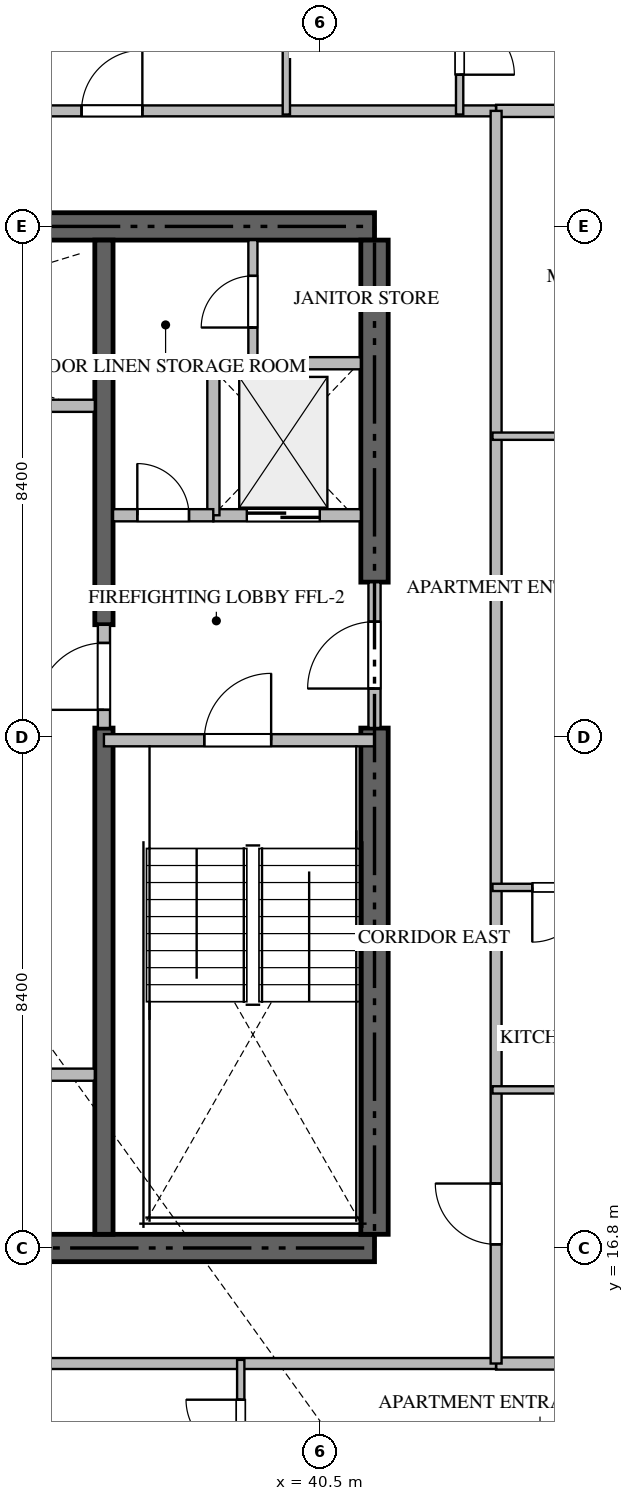
"""IFC4 building model, lengths in metres.
Left out: names, types, materials, properties, quantities, classifications, styles, units other than length and angle.
Written with IfcOpenShell. Run it as: python <this file> out.ifc"""

import sys

from ifc_helpers import new_model, si_unit, direction, frame, frame_2d, origin, place, context, subcontext, project, spatial, rectangle, extrude, source, transform, mapped, element, fill, save


model = new_model("IFC4")
c1 = context("Model", 3, precision=1e-05, world=origin(), true_north=direction((0.0, 1.0)))
c2 = subcontext(c1, "Body", "Model", "MODEL_VIEW")
j1 = project(units=[si_unit("LENGTHUNIT", "METRE"), si_unit("PLANEANGLEUNIT", "RADIAN")], contexts=[c1])
p1 = place(None, origin())
s1 = spatial("IfcSite", under=j1, at=p1, CompositionType="ELEMENT")
p2 = place(p1, origin())
s2 = spatial("IfcBuilding", under=s1, at=p2, CompositionType="ELEMENT")
p3 = place(p2, frame((0.0, 0.0, 41.7)))
s3 = spatial("IfcBuildingStorey", under=s2, at=p3, CompositionType="ELEMENT", Elevation=41.7)
for number, where, z_axis, x_axis in (
    (1, (23.4, 16.8, -0.26), (0.0, 0.0, 1.0), (1.0, 0.0, 0.0)),
    (2, (41.4, 33.6, -0.26), (0.0, 0.0, 1.0), (-1.0, 0.0, 0.0)),
):
    element("IfcWall", number, at=place(p3, frame(where, z_axis=z_axis, x_axis=x_axis)), inside=s3, PredefinedType="SHEAR", context=c2, shape_type="SweptSolid", body=[
        extrude(rectangle(XDim=18.0, YDim=0.45, at=frame_2d((9.0, 0.0))), origin(), (0.0, 0.0, 1.0), 3.748),
    ])
p4 = place(p3, frame((41.4, 17.025, -0.26), z_axis=(0.0, 0.0, 1.0), x_axis=(0.0, 1.0, 0.0)))
e3 = element("IfcWall", 3, at=p4, inside=s3, PredefinedType="SHEAR", context=c2, shape_type="SweptSolid", body=[
    extrude(rectangle(XDim=8.325, YDim=0.45, at=frame_2d((4.163, 0.0))), origin(), (0.0, 0.0, 1.0), 3.748),
])
p5 = place(p3, frame((41.4, 27.75, -0.26), z_axis=(0.0, 0.0, 1.0), x_axis=(0.0, 1.0, 0.0)))
e4 = element("IfcWall", 4, at=p5, inside=s3, PredefinedType="SHEAR", context=c2, shape_type="SweptSolid", body=[
    extrude(rectangle(XDim=5.625, YDim=0.45, at=frame_2d((2.812, 0.0))), origin(), (0.0, 0.0, 1.0), 3.748),
])
p6 = place(p3, frame((36.95, 17.025, -0.26), z_axis=(0.0, 0.0, 1.0), x_axis=(0.0, 1.0, 0.0)))
e5 = element("IfcWall", 5, at=p6, inside=s3, PredefinedType="SHEAR", context=c2, shape_type="SweptSolid", body=[
    extrude(rectangle(XDim=8.325, YDim=0.3, at=frame_2d((4.163, 0.0))), origin(), (0.0, 0.0, 1.0), 3.748),
])
p7 = place(p3, frame((36.95, 27.05, -0.26), z_axis=(0.0, 0.0, 1.0), x_axis=(0.0, 1.0, 0.0)))
e6 = element("IfcWall", 6, at=p7, inside=s3, PredefinedType="SHEAR", context=c2, shape_type="SweptSolid", body=[
    extrude(rectangle(XDim=6.325, YDim=0.3, at=frame_2d((3.163, 0.0))), origin(), (0.0, 0.0, 1.0), 3.748),
])
p8 = place(p3, frame((36.95, 25.15, 0.0), z_axis=(0.0, 0.0, 1.0), x_axis=(1.0, 0.0, 0.0)))
e7 = element("IfcWall", 7, at=p8, inside=s3, PredefinedType="STANDARD", context=c2, shape_type="SweptSolid", body=[
    extrude(rectangle(XDim=4.45, YDim=0.2, at=frame_2d((2.225, 0.0))), origin(), (0.0, 0.0, 1.0), 3.49),
])
p9 = place(p8, frame((1.65, 0.0, 0.0)))
e8 = element("IfcOpeningElement", 8, at=p9, cuts=e7, PredefinedType="OPENING", context=c2, shape_type="SweptSolid", body=[
    extrude(rectangle(XDim=1.1, YDim=2.15, at=frame_2d((0.55, 1.075))), frame((0.0, 0.11, 0.0), z_axis=(0.0, -1.0, 0.0), x_axis=(1.0, 0.0, 0.0)), (0.0, 0.0, 1.0), 0.22),
])
p10 = place(p3, frame((38.75, 28.85, 0.0), z_axis=(0.0, 0.0, 1.0), x_axis=(1.0, 0.0, 0.0)))
e9 = element("IfcWall", 9, at=p10, inside=s3, PredefinedType="STANDARD", context=c2, shape_type="SweptSolid", body=[
    extrude(rectangle(XDim=2.425, YDim=0.2, at=frame_2d((1.212, 0.0))), origin(), (0.0, 0.0, 1.0), 3.49),
])
p11 = place(p10, frame((0.55, 0.0, 0.0)))
e10 = element("IfcOpeningElement", 10, at=p11, cuts=e9, PredefinedType="OPENING", context=c2, shape_type="SweptSolid", body=[
    extrude(rectangle(XDim=1.2, YDim=2.2, at=frame_2d((0.6, 1.1))), frame((0.0, 0.11, 0.0), z_axis=(0.0, -1.0, 0.0), x_axis=(1.0, 0.0, 0.0)), (0.0, 0.0, 1.0), 0.22),
])
p12 = place(p3, frame((33.05, 19.65, 0.0), z_axis=(0.0, 0.0, 1.0), x_axis=(1.0, 0.0, 0.0)))
e11 = element("IfcWall", 11, at=p12, inside=s3, PredefinedType="STANDARD", context=c2, shape_type="SweptSolid", body=[
    extrude(rectangle(XDim=3.75, YDim=0.2, at=frame_2d((1.875, 0.0))), origin(), (0.0, 0.0, 1.0), 3.49),
])
p13 = place(p12, frame((0.65, 0.0, 0.0)))
e12 = element("IfcOpeningElement", 12, at=p13, cuts=e11, PredefinedType="OPENING", context=c2, shape_type="SweptSolid", body=[
    extrude(rectangle(XDim=1.1, YDim=2.2, at=frame_2d((0.55, 1.1))), frame((0.0, 0.11, 0.0), z_axis=(0.0, -1.0, 0.0), x_axis=(1.0, 0.0, 0.0)), (0.0, 0.0, 1.0), 0.22),
])
p14 = place(p3, frame((35.0, 30.65, 0.0), z_axis=(0.0, 0.0, 1.0), x_axis=(1.0, 0.0, 0.0)))
e13 = element("IfcWall", 13, at=p14, inside=s3, PredefinedType="STANDARD", context=c2, shape_type="SweptSolid", body=[
    extrude(rectangle(XDim=1.8, YDim=0.2, at=frame_2d((0.9, 0.0))), origin(), (0.0, 0.0, 1.0), 3.49),
])
p15 = place(p3, frame((38.75, 28.85, 0.0), z_axis=(0.0, 0.0, 1.0), x_axis=(0.0, 1.0, 0.0)))
e14 = element("IfcWall", 14, at=p15, inside=s3, PredefinedType="STANDARD", context=c2, shape_type="SweptSolid", body=[
    extrude(rectangle(XDim=2.5, YDim=0.2, at=frame_2d((1.25, 0.0))), origin(), (0.0, 0.0, 1.0), 3.49),
])
p16 = place(p3, frame((38.75, 31.35, 0.0), z_axis=(0.0, 0.0, 1.0), x_axis=(1.0, 0.0, 0.0)))
e15 = element("IfcWall", 15, at=p16, inside=s3, PredefinedType="STANDARD", context=c2, shape_type="SweptSolid", body=[
    extrude(rectangle(XDim=2.425, YDim=0.2, at=frame_2d((1.212, 0.0))), origin(), (0.0, 0.0, 1.0), 3.49),
])
p17 = place(p3, frame((37.1, 28.85, 0.0), z_axis=(0.0, 0.0, 1.0), x_axis=(1.0, 0.0, 0.0)))
e16 = element("IfcWall", 16, at=p17, inside=s3, PredefinedType="STANDARD", context=c2, shape_type="SweptSolid", body=[
    extrude(rectangle(XDim=1.648, YDim=0.2, at=frame_2d((0.824, 0.0))), origin(), (0.0, 0.0, 1.0), 3.49),
])
p18 = place(p17, frame((0.399, 0.0, 0.0)))
e17 = element("IfcOpeningElement", 17, at=p18, cuts=e16, PredefinedType="OPENING", context=c2, shape_type="SweptSolid", body=[
    extrude(rectangle(XDim=0.85, YDim=2.1, at=frame_2d((0.425, 1.05))), frame((0.0, 0.11, 0.0), z_axis=(0.0, -1.0, 0.0), x_axis=(1.0, 0.0, 0.0)), (0.0, 0.0, 1.0), 0.22),
])
p19 = place(p3, frame((41.4, 25.352, 0.0), z_axis=(0.0, 0.0, 1.0), x_axis=(0.0, 1.0, 0.0)))
e18 = element("IfcWall", 18, at=p19, inside=s3, PredefinedType="STANDARD", context=c2, shape_type="SweptSolid", body=[
    extrude(rectangle(XDim=2.396, YDim=0.2, at=frame_2d((1.198, 0.0))), origin(), (0.0, 0.0, 1.0), 3.49),
])
p20 = place(p19, frame((0.648, 0.0, 0.0)))
e19 = element("IfcOpeningElement", 19, at=p20, cuts=e18, PredefinedType="OPENING", context=c2, shape_type="SweptSolid", body=[
    extrude(rectangle(XDim=1.1, YDim=2.15, at=frame_2d((0.55, 1.075))), frame((0.0, 0.11, 0.0), z_axis=(0.0, -1.0, 0.0), x_axis=(1.0, 0.0, 0.0)), (0.0, 0.0, 1.0), 0.22),
])
p21 = place(p3, frame((36.95, 25.352, 0.0), z_axis=(0.0, 0.0, 1.0), x_axis=(0.0, 1.0, 0.0)))
e20 = element("IfcWall", 20, at=p21, inside=s3, PredefinedType="STANDARD", context=c2, shape_type="SweptSolid", body=[
    extrude(rectangle(XDim=1.696, YDim=0.2, at=frame_2d((0.848, 0.0))), origin(), (0.0, 0.0, 1.0), 3.49),
])
p22 = place(p21, frame((0.298, 0.0, 0.0)))
e21 = element("IfcOpeningElement", 21, at=p22, cuts=e20, PredefinedType="OPENING", context=c2, shape_type="SweptSolid", body=[
    extrude(rectangle(XDim=1.1, YDim=2.15, at=frame_2d((0.55, 1.075))), frame((0.0, 0.11, 0.0), z_axis=(0.0, -1.0, 0.0), x_axis=(1.0, 0.0, 0.0)), (0.0, 0.0, 1.0), 0.22),
])
p23 = place(p3, frame((39.4, 31.35, 0.0), z_axis=(0.0, 0.0, 1.0), x_axis=(0.0, 1.0, 0.0)))
e22 = element("IfcWall", 22, at=p23, inside=s3, PredefinedType="PARTITIONING", context=c2, shape_type="SweptSolid", body=[
    extrude(rectangle(XDim=2.025, YDim=0.15, at=frame_2d((1.012, 0.0))), origin(), (0.0, 0.0, 1.0), 3.49),
])
p24 = place(p23, frame((0.587, 0.0, 0.0)))
e23 = element("IfcOpeningElement", 23, at=p24, cuts=e22, PredefinedType="OPENING", context=c2, shape_type="SweptSolid", body=[
    extrude(rectangle(XDim=0.85, YDim=2.1, at=frame_2d((0.425, 1.05))), frame((0.0, 0.085, 0.0), z_axis=(0.0, -1.0, 0.0), x_axis=(1.0, 0.0, 0.0)), (0.0, 0.0, 1.0), 0.17),
])
for number, where, z_axis, x_axis in (
    (24, (43.4, 14.9, 0.0), (0.0, 0.0, 1.0), (1.0, 0.0, 0.0)),
    (25, (43.4, 35.5, 0.0), (0.0, 0.0, 1.0), (1.0, 0.0, 0.0)),
):
    element("IfcWall", number, at=place(p3, frame(where, z_axis=z_axis, x_axis=x_axis)), inside=s3, PredefinedType="PARTITIONING", context=c2, shape_type="SweptSolid", body=[
        extrude(rectangle(XDim=15.318, YDim=0.2, at=frame_2d((7.659, 0.0))), origin(), (0.0, 0.0, 1.0), 3.49),
    ])
p25 = place(p3, frame((21.402, 14.9, 0.0), z_axis=(0.0, 0.0, 1.0), x_axis=(1.0, 0.0, 0.0)))
e26 = element("IfcWall", 26, at=p25, inside=s3, PredefinedType="PARTITIONING", context=c2, shape_type="SweptSolid", body=[
    extrude(rectangle(XDim=21.996, YDim=0.18, at=frame_2d((10.998, 0.0))), origin(), (0.0, 0.0, 1.0), 3.49),
])
p26 = place(p25, frame((5.816, 0.0, 0.0)))
e27 = element("IfcOpeningElement", 27, at=p26, cuts=e26, PredefinedType="OPENING", context=c2, shape_type="SweptSolid", body=[
    extrude(rectangle(XDim=1.0, YDim=2.15, at=frame_2d((0.5, 1.075))), frame((0.0, 0.1, 0.0), z_axis=(0.0, -1.0, 0.0), x_axis=(1.0, 0.0, 0.0)), (0.0, 0.0, 1.0), 0.2),
])
p27 = place(p25, frame((11.044, 0.0, 0.0)))
e28 = element("IfcOpeningElement", 28, at=p27, cuts=e26, PredefinedType="OPENING", context=c2, shape_type="SweptSolid", body=[
    extrude(rectangle(XDim=1.0, YDim=2.15, at=frame_2d((0.5, 1.075))), frame((0.0, 0.1, 0.0), z_axis=(0.0, -1.0, 0.0), x_axis=(1.0, 0.0, 0.0)), (0.0, 0.0, 1.0), 0.2),
])
p28 = place(p3, frame((21.402, 35.5, 0.0), z_axis=(0.0, 0.0, 1.0), x_axis=(1.0, 0.0, 0.0)))
e29 = element("IfcWall", 29, at=p28, inside=s3, PredefinedType="PARTITIONING", context=c2, shape_type="SweptSolid", body=[
    extrude(rectangle(XDim=21.996, YDim=0.18, at=frame_2d((10.998, 0.0))), origin(), (0.0, 0.0, 1.0), 3.49),
])
p29 = place(p28, frame((9.952, 0.0, 0.0)))
e30 = element("IfcOpeningElement", 30, at=p29, cuts=e29, PredefinedType="OPENING", context=c2, shape_type="SweptSolid", body=[
    extrude(rectangle(XDim=1.0, YDim=2.15, at=frame_2d((0.5, 1.075))), frame((0.0, 0.1, 0.0), z_axis=(0.0, -1.0, 0.0), x_axis=(1.0, 0.0, 0.0)), (0.0, 0.0, 1.0), 0.2),
])
p30 = place(p28, frame((15.18, 0.0, 0.0)))
e31 = element("IfcOpeningElement", 31, at=p30, cuts=e29, PredefinedType="OPENING", context=c2, shape_type="SweptSolid", body=[
    extrude(rectangle(XDim=1.0, YDim=2.15, at=frame_2d((0.5, 1.075))), frame((0.0, 0.1, 0.0), z_axis=(0.0, -1.0, 0.0), x_axis=(1.0, 0.0, 0.0)), (0.0, 0.0, 1.0), 0.2),
])
p31 = place(p3, frame((43.4, 14.9, 0.0), z_axis=(0.0, 0.0, 1.0), x_axis=(0.0, 1.0, 0.0)))
e32 = element("IfcWall", 32, at=p31, inside=s3, PredefinedType="PARTITIONING", context=c2, shape_type="SweptSolid", body=[
    extrude(rectangle(XDim=20.6, YDim=0.18, at=frame_2d((10.3, 0.0))), origin(), (0.0, 0.0, 1.0), 3.49),
])
p32 = place(p31, frame((1.96, 0.0, 0.0)))
e33 = element("IfcOpeningElement", 33, at=p32, cuts=e32, PredefinedType="OPENING", context=c2, shape_type="SweptSolid", body=[
    extrude(rectangle(XDim=1.0, YDim=2.15, at=frame_2d((0.5, 1.075))), frame((0.0, 0.1, 0.0), z_axis=(0.0, -1.0, 0.0), x_axis=(1.0, 0.0, 0.0)), (0.0, 0.0, 1.0), 0.2),
])
p33 = place(p3, frame((39.2, 12.75, 0.0), z_axis=(0.0, 0.0, 1.0), x_axis=(0.0, 1.0, 0.0)))
e34 = element("IfcWall", 34, at=p33, inside=s3, PredefinedType="PARTITIONING", context=c2, shape_type="SweptSolid", body=[
    extrude(rectangle(XDim=2.21, YDim=0.12, at=frame_2d((1.105, 0.0))), origin(), (0.0, 0.0, 1.0), 3.49),
])
p34 = place(p33, frame((0.655, 0.0, 0.0)))
e35 = element("IfcOpeningElement", 35, at=p34, cuts=e34, PredefinedType="OPENING", context=c2, shape_type="SweptSolid", body=[
    extrude(rectangle(XDim=0.9, YDim=2.1, at=frame_2d((0.45, 1.05))), frame((0.0, 0.07, 0.0), z_axis=(0.0, -1.0, 0.0), x_axis=(1.0, 0.0, 0.0)), (0.0, 0.0, 1.0), 0.14),
])
p35 = place(p3, frame((39.95, 38.25, 0.0), z_axis=(0.0, 0.0, 1.0), x_axis=(0.0, -1.0, 0.0)))
e36 = element("IfcWall", 36, at=p35, inside=s3, PredefinedType="PARTITIONING", context=c2, shape_type="SweptSolid", body=[
    extrude(rectangle(XDim=2.81, YDim=0.12, at=frame_2d((1.405, 0.0))), origin(), (0.0, 0.0, 1.0), 3.49),
])
p36 = place(p3, frame((42.8, 37.65, 0.0), z_axis=(0.0, 0.0, 1.0), x_axis=(0.0, -1.0, 0.0)))
e37 = element("IfcWall", 37, at=p36, inside=s3, PredefinedType="PARTITIONING", context=c2, shape_type="SweptSolid", body=[
    extrude(rectangle(XDim=2.21, YDim=0.12, at=frame_2d((1.105, 0.0))), origin(), (0.0, 0.0, 1.0), 3.49),
])
p37 = place(p36, frame((0.655, 0.0, 0.0)))
e38 = element("IfcOpeningElement", 38, at=p37, cuts=e37, PredefinedType="OPENING", context=c2, shape_type="SweptSolid", body=[
    extrude(rectangle(XDim=0.9, YDim=2.1, at=frame_2d((0.45, 1.05))), frame((0.0, 0.07, 0.0), z_axis=(0.0, -1.0, 0.0), x_axis=(1.0, 0.0, 0.0)), (0.0, 0.0, 1.0), 0.14),
])
p38 = place(p3, frame((46.15, 19.4, 0.0), z_axis=(0.0, 0.0, 1.0), x_axis=(-1.0, 0.0, 0.0)))
e39 = element("IfcWall", 39, at=p38, inside=s3, PredefinedType="PARTITIONING", context=c2, shape_type="SweptSolid", body=[
    extrude(rectangle(XDim=2.81, YDim=0.12, at=frame_2d((1.405, 0.0))), origin(), (0.0, 0.0, 1.0), 3.49),
])
p39 = place(p3, frame((45.55, 22.73, 0.0), z_axis=(0.0, 0.0, 1.0), x_axis=(-1.0, 0.0, 0.0)))
e40 = element("IfcWall", 40, at=p39, inside=s3, PredefinedType="PARTITIONING", context=c2, shape_type="SweptSolid", body=[
    extrude(rectangle(XDim=2.21, YDim=0.12, at=frame_2d((1.105, 0.0))), origin(), (0.0, 0.0, 1.0), 3.49),
])
p40 = place(p39, frame((0.655, 0.0, 0.0)))
e41 = element("IfcOpeningElement", 41, at=p40, cuts=e40, PredefinedType="OPENING", context=c2, shape_type="SweptSolid", body=[
    extrude(rectangle(XDim=0.9, YDim=2.1, at=frame_2d((0.45, 1.05))), frame((0.0, 0.07, 0.0), z_axis=(0.0, -1.0, 0.0), x_axis=(1.0, 0.0, 0.0)), (0.0, 0.0, 1.0), 0.14),
])
p41 = place(p3, frame((45.548, 30.15, 0.0), z_axis=(0.0, 0.0, 1.0), x_axis=(-1.0, 0.0, 0.0)))
e42 = element("IfcWall", 42, at=p41, inside=s3, PredefinedType="PARTITIONING", context=c2, shape_type="SweptSolid", body=[
    extrude(rectangle(XDim=2.208, YDim=0.12, at=frame_2d((1.104, 0.0))), origin(), (0.0, 0.0, 1.0), 3.49),
])
m1 = source(origin(), c2, "Body", "SweptSolid", [
    extrude(rectangle(XDim=1.1, YDim=2.15, at=frame_2d((0.55, 1.075))), frame((0.0, 0.025, 0.0), z_axis=(0.0, -1.0, 0.0), x_axis=(1.0, 0.0, 0.0)), (0.0, 0.0, 1.0), 0.05),
])
p42 = place(p9, origin())
e43 = element("IfcDoor", 43, at=p42, inside=s3, OperationType="SINGLE_SWING_RIGHT", PredefinedType="DOOR", context=c2, shape_type="MappedRepresentation", body=[
    mapped(m1, transform((0.0, 0.0, 0.0), scale=1.0)),
])
fill(e8, e43)
m2 = source(origin(), c2, "Body", "SweptSolid", [
    extrude(rectangle(XDim=1.2, YDim=2.2, at=frame_2d((0.6, 1.1))), frame((0.0, 0.025, 0.0), z_axis=(0.0, -1.0, 0.0), x_axis=(1.0, 0.0, 0.0)), (0.0, 0.0, 1.0), 0.05),
])
p43 = place(p11, origin())
e44 = element("IfcDoor", 44, at=p43, inside=s3, OperationType="DOUBLE_DOOR_SLIDING", PredefinedType="DOOR", context=c2, shape_type="MappedRepresentation", body=[
    mapped(m2, transform((0.0, 0.0, 0.0), scale=1.0)),
])
fill(e10, e44)
m3 = source(origin(), c2, "Body", "SweptSolid", [
    extrude(rectangle(XDim=0.85, YDim=2.1, at=frame_2d((0.425, 1.05))), frame((0.0, 0.025, 0.0), z_axis=(0.0, -1.0, 0.0), x_axis=(1.0, 0.0, 0.0)), (0.0, 0.0, 1.0), 0.05),
])
p44 = place(p18, origin())
e45 = element("IfcDoor", 45, at=p44, inside=s3, OperationType="SINGLE_SWING_LEFT", PredefinedType="DOOR", context=c2, shape_type="MappedRepresentation", body=[
    mapped(m3, transform((0.0, 0.0, 0.0), scale=1.0)),
])
fill(e17, e45)
p45 = place(p20, origin())
e46 = element("IfcDoor", 46, at=p45, inside=s3, OperationType="SINGLE_SWING_LEFT", PredefinedType="DOOR", context=c2, shape_type="MappedRepresentation", body=[
    mapped(m1, transform((0.0, 0.0, 0.0), scale=1.0)),
])
fill(e19, e46)
p46 = place(p22, origin())
e47 = element("IfcDoor", 47, at=p46, inside=s3, OperationType="SINGLE_SWING_LEFT", PredefinedType="DOOR", context=c2, shape_type="MappedRepresentation", body=[
    mapped(m1, transform((0.0, 0.0, 0.0), scale=1.0)),
])
fill(e21, e47)
p47 = place(p24, origin())
e48 = element("IfcDoor", 48, at=p47, inside=s3, OperationType="SINGLE_SWING_LEFT", PredefinedType="DOOR", context=c2, shape_type="MappedRepresentation", body=[
    mapped(m3, transform((0.0, 0.0, 0.0), scale=1.0)),
])
fill(e23, e48)
m4 = source(origin(), c2, "Body", "SweptSolid", [
    extrude(rectangle(XDim=1.0, YDim=2.15, at=frame_2d((0.5, 1.075))), frame((0.0, 0.025, 0.0), z_axis=(0.0, -1.0, 0.0), x_axis=(1.0, 0.0, 0.0)), (0.0, 0.0, 1.0), 0.05),
])
p48 = place(p30, origin())
e49 = element("IfcDoor", 49, at=p48, inside=s3, OperationType="SINGLE_SWING_RIGHT", PredefinedType="DOOR", context=c2, shape_type="MappedRepresentation", body=[
    mapped(m4, transform((0.0, 0.0, 0.0), scale=1.0)),
])
fill(e31, e49)
p49 = place(p32, origin())
e50 = element("IfcDoor", 50, at=p49, inside=s3, OperationType="SINGLE_SWING_RIGHT", PredefinedType="DOOR", context=c2, shape_type="MappedRepresentation", body=[
    mapped(m4, transform((0.0, 0.0, 0.0), scale=1.0)),
])
fill(e33, e50)
m5 = source(origin(), c2, "Body", "SweptSolid", [
    extrude(rectangle(XDim=0.9, YDim=2.1, at=frame_2d((0.45, 1.05))), frame((0.0, 0.025, 0.0), z_axis=(0.0, -1.0, 0.0), x_axis=(1.0, 0.0, 0.0)), (0.0, 0.0, 1.0), 0.05),
])
p50 = place(p34, origin())
e51 = element("IfcDoor", 51, at=p50, inside=s3, OperationType="SINGLE_SWING_RIGHT", PredefinedType="DOOR", context=c2, shape_type="MappedRepresentation", body=[
    mapped(m5, transform((0.0, 0.0, 0.0), scale=1.0)),
])
fill(e35, e51)
p51 = place(p37, origin())
e52 = element("IfcDoor", 52, at=p51, inside=s3, OperationType="SINGLE_SWING_RIGHT", PredefinedType="DOOR", context=c2, shape_type="MappedRepresentation", body=[
    mapped(m5, transform((0.0, 0.0, 0.0), scale=1.0)),
])
fill(e38, e52)
p52 = place(p40, origin())
e53 = element("IfcDoor", 53, at=p52, inside=s3, OperationType="SINGLE_SWING_RIGHT", PredefinedType="DOOR", context=c2, shape_type="MappedRepresentation", body=[
    mapped(m5, transform((0.0, 0.0, 0.0), scale=1.0)),
])
fill(e41, e53)
save(model, sys.argv[1])
